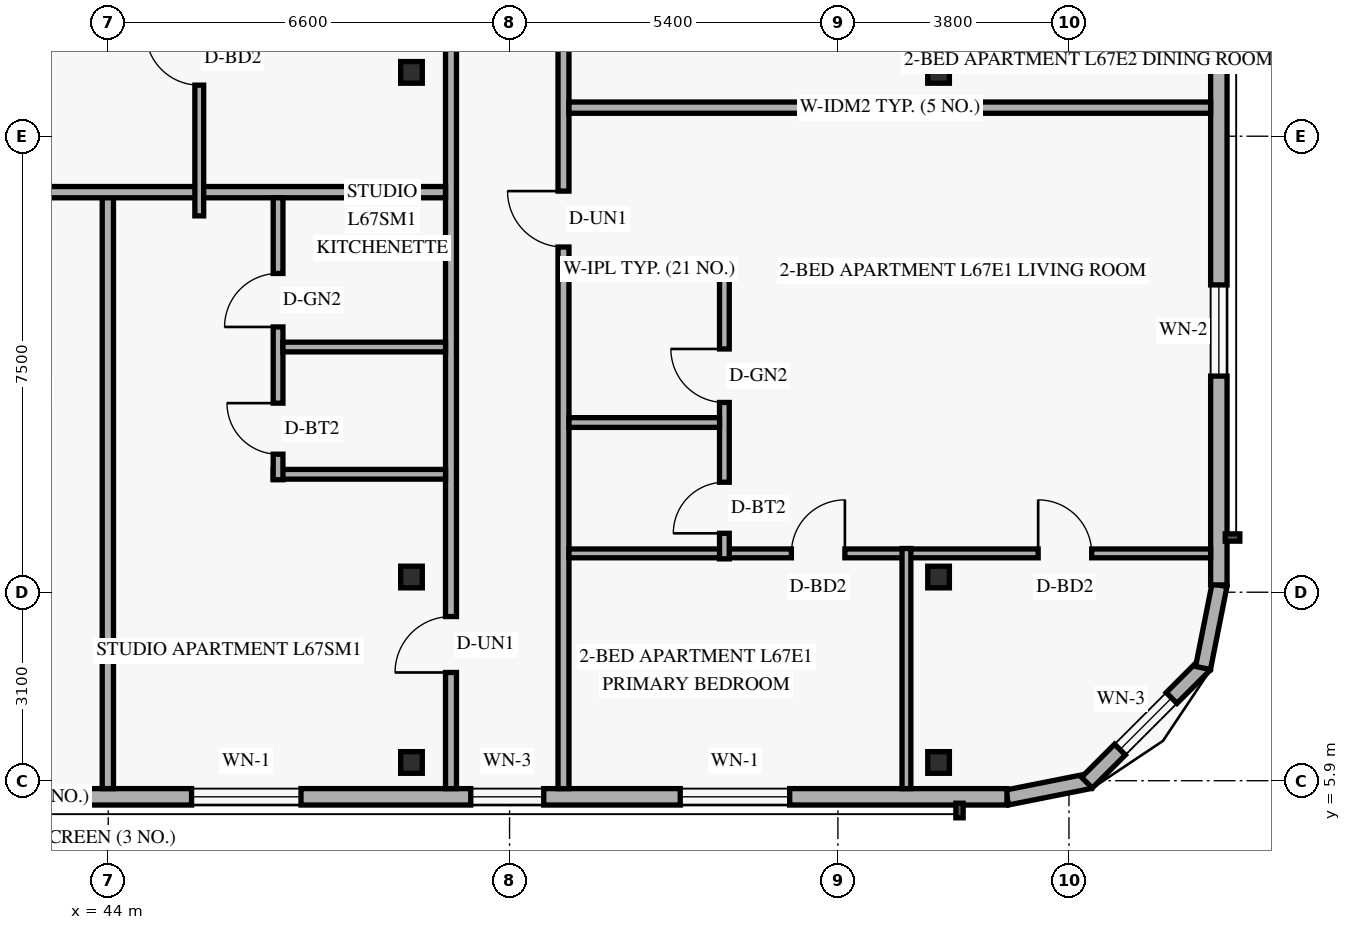
"""IFC4 building model, lengths in metres.
Left out: names, types, materials, properties, quantities, classifications, styles, units other than length and angle.
Written with IfcOpenShell. Run it as: python <this file> out.ifc"""

import sys

from ifc_helpers import new_model, si_unit, direction, frame, frame_2d, origin, origin_2d, place, context, subcontext, project, spatial, rectangle, hollow_rectangle, extrude, element, fill, save


model = new_model("IFC4")
c1 = context("Model", 3, precision=1e-05, world=origin(), true_north=direction((0.0, 1.0)))
c2 = subcontext(c1, "Body", "Model", "MODEL_VIEW")
j1 = project(units=[si_unit("LENGTHUNIT", "METRE"), si_unit("PLANEANGLEUNIT", "RADIAN")], contexts=[c1])
p1 = place(None, origin())
s1 = spatial("IfcSite", under=j1, at=p1, CompositionType="ELEMENT")
p2 = place(p1, origin())
s2 = spatial("IfcBuilding", under=s1, at=p2, CompositionType="ELEMENT")
p3 = place(p2, frame((0.0, 0.0, 256.8)))
s3 = spatial("IfcBuildingStorey", under=s2, at=p3, CompositionType="ELEMENT", Elevation=256.8)
for number, where, z_axis, x_axis in (
    (1, (48.924, 6.2, 0.0), (0.035, 0.0, 0.999), (0.0, 1.0, 0.0)),
    (2, (48.924, 9.25, 0.0), (0.035, 0.0, 0.999), (0.0, 1.0, 0.0)),
    (3, (48.924, 17.55, 0.0), (0.035, 0.0, 0.999), (0.0, 1.0, 0.0)),
):
    element("IfcColumn", number, at=place(p3, frame(where, z_axis=z_axis, x_axis=x_axis)), inside=s3, PredefinedType="COLUMN", context=c2, shape_type="SweptSolid", body=[
        extrude(hollow_rectangle(XDim=0.356, YDim=0.356, WallThickness=0.016, at=origin_2d()), origin(), (0.0, 0.0, 1.0), 3.602),
    ])
for number, where, z_axis, x_axis in (
    (4, (57.551, 6.2, 0.0), (0.058, 0.0, 0.998), (0.0, 1.0, 0.0)),
    (5, (57.551, 9.25, 0.0), (0.058, 0.0, 0.998), (0.0, 1.0, 0.0)),
    (6, (57.551, 17.55, 0.0), (0.058, 0.0, 0.998), (0.0, 1.0, 0.0)),
):
    element("IfcColumn", number, at=place(p3, frame(where, z_axis=z_axis, x_axis=x_axis)), inside=s3, PredefinedType="COLUMN", context=c2, shape_type="SweptSolid", body=[
        extrude(hollow_rectangle(XDim=0.356, YDim=0.356, WallThickness=0.016, at=origin_2d()), origin(), (0.0, 0.0, 1.0), 3.606),
    ])
p4 = place(p3, frame((58.783, 5.624, 0.0), z_axis=(0.0, 0.0, 1.0), x_axis=(0.980809899341, 0.19496651342, 0.0)))
e7 = element("IfcWall", 7, at=p4, inside=s3, PredefinedType="SOLIDWALL", context=c2, shape_type="SweptSolid", body=[
    extrude(rectangle(XDim=1.389, YDim=0.25, at=frame_2d((0.694, 0.0))), origin(), (0.0, 0.0, 1.0), 3.36),
])
p5 = place(p3, frame((60.095, 5.868, 0.0), z_axis=(0.0, 0.0, 1.0), x_axis=(0.707106781187, 0.707106781187, 0.0)))
e8 = element("IfcWall", 8, at=p5, inside=s3, PredefinedType="SOLIDWALL", context=c2, shape_type="SweptSolid", body=[
    extrude(rectangle(XDim=2.739, YDim=0.25, at=frame_2d((1.37, 0.0))), origin(), (0.0, 0.0, 1.0), 3.36),
])
p6 = place(p5, frame((0.77, 0.0, 0.85)))
e9 = element("IfcOpeningElement", 9, at=p6, cuts=e8, PredefinedType="OPENING", context=c2, shape_type="SweptSolid", body=[
    extrude(rectangle(XDim=1.2, YDim=1.5, at=frame_2d((0.6, 0.75))), frame((0.0, 0.135, 0.0), z_axis=(0.0, -1.0, 0.0), x_axis=(1.0, 0.0, 0.0)), (0.0, 0.0, 1.0), 0.27),
])
p7 = place(p3, frame((62.005, 7.754, 0.0), z_axis=(0.0, 0.0, 1.0), x_axis=(0.195135625965, 0.9807762678, 0.0)))
e10 = element("IfcWall", 10, at=p7, inside=s3, PredefinedType="SOLIDWALL", context=c2, shape_type="SweptSolid", body=[
    extrude(rectangle(XDim=1.389, YDim=0.25, at=frame_2d((0.694, 0.0))), origin(), (0.0, 0.0, 1.0), 3.36),
])
p8 = place(p3, frame((25.82, 5.635, 0.0), z_axis=(0.0, 0.0, 1.0), x_axis=(1.0, 0.0, 0.0)))
e11 = element("IfcWall", 11, at=p8, inside=s3, PredefinedType="SOLIDWALL", context=c2, shape_type="SweptSolid", body=[
    extrude(rectangle(XDim=32.96, YDim=0.27, at=frame_2d((16.48, 0.0))), origin(), (0.0, 0.0, 1.0), 3.36),
])
p9 = place(p8, frame((3.57, 0.0, 0.85)))
e12 = element("IfcOpeningElement", 12, at=p9, cuts=e11, PredefinedType="OPENING", context=c2, shape_type="SweptSolid", body=[
    extrude(rectangle(XDim=1.8, YDim=1.6, at=frame_2d((0.9, 0.8))), frame((0.0, 0.145, 0.0), z_axis=(0.0, -1.0, 0.0), x_axis=(1.0, 0.0, 0.0)), (0.0, 0.0, 1.0), 0.29),
])
p10 = place(p8, frame((19.55, 0.0, 0.85)))
e13 = element("IfcOpeningElement", 13, at=p10, cuts=e11, PredefinedType="OPENING", context=c2, shape_type="SweptSolid", body=[
    extrude(rectangle(XDim=1.8, YDim=1.6, at=frame_2d((0.9, 0.8))), frame((0.0, 0.145, 0.0), z_axis=(0.0, -1.0, 0.0), x_axis=(1.0, 0.0, 0.0)), (0.0, 0.0, 1.0), 0.29),
])
p11 = place(p8, frame((24.142, 0.0, 0.85)))
e14 = element("IfcOpeningElement", 14, at=p11, cuts=e11, PredefinedType="OPENING", context=c2, shape_type="SweptSolid", body=[
    extrude(rectangle(XDim=1.2, YDim=1.5, at=frame_2d((0.6, 0.75))), frame((0.0, 0.145, 0.0), z_axis=(0.0, -1.0, 0.0), x_axis=(1.0, 0.0, 0.0)), (0.0, 0.0, 1.0), 0.29),
])
p12 = place(p8, frame((27.587, 0.0, 0.85)))
e15 = element("IfcOpeningElement", 15, at=p12, cuts=e11, PredefinedType="OPENING", context=c2, shape_type="SweptSolid", body=[
    extrude(rectangle(XDim=1.8, YDim=1.6, at=frame_2d((0.9, 0.8))), frame((0.0, 0.145, 0.0), z_axis=(0.0, -1.0, 0.0), x_axis=(1.0, 0.0, 0.0)), (0.0, 0.0, 1.0), 0.29),
])
p13 = place(p3, frame((62.265, 9.12, 0.0), z_axis=(0.0, 0.0, 1.0), x_axis=(0.0, 1.0, 0.0)))
e16 = element("IfcWall", 16, at=p13, inside=s3, PredefinedType="SOLIDWALL", context=c2, shape_type="SweptSolid", body=[
    extrude(rectangle(XDim=11.105, YDim=0.27, at=frame_2d((5.553, 0.0))), origin(), (0.0, 0.0, 1.0), 3.36),
])
p14 = place(p13, frame((3.435, 0.0, 0.85)))
e17 = element("IfcOpeningElement", 17, at=p14, cuts=e16, PredefinedType="OPENING", context=c2, shape_type="SweptSolid", body=[
    extrude(rectangle(XDim=1.5, YDim=1.55, at=frame_2d((0.75, 0.775))), frame((0.0, 0.145, 0.0), z_axis=(0.0, -1.0, 0.0), x_axis=(1.0, 0.0, 0.0)), (0.0, 0.0, 1.0), 0.29),
])
p15 = place(p13, frame((8.728, 0.0, 0.85)))
e18 = element("IfcOpeningElement", 18, at=p15, cuts=e16, PredefinedType="OPENING", context=c2, shape_type="SweptSolid", body=[
    extrude(rectangle(XDim=1.5, YDim=1.55, at=frame_2d((0.75, 0.775))), frame((0.0, 0.145, 0.0), z_axis=(0.0, -1.0, 0.0), x_axis=(1.0, 0.0, 0.0)), (0.0, 0.0, 1.0), 0.29),
])
p16 = place(p3, frame((49.637, 5.77, 0.0), z_axis=(0.0, 0.0, 1.0), x_axis=(0.0, 1.0, 0.0)))
e19 = element("IfcWall", 19, at=p16, inside=s3, PredefinedType="STANDARD", context=c2, shape_type="SweptSolid", body=[
    extrude(rectangle(XDim=17.03, YDim=0.18, at=frame_2d((8.515, 0.0))), origin(), (0.0, 0.0, 1.0), 2.803),
])
p17 = place(p16, frame((1.91, 0.0, 0.0)))
e20 = element("IfcOpeningElement", 20, at=p17, cuts=e19, PredefinedType="OPENING", context=c2, shape_type="SweptSolid", body=[
    extrude(rectangle(XDim=0.92, YDim=2.15, at=frame_2d((0.46, 1.075))), frame((0.0, 0.1, 0.0), z_axis=(0.0, -1.0, 0.0), x_axis=(1.0, 0.0, 0.0)), (0.0, 0.0, 1.0), 0.2),
])
p18 = place(p3, frame((51.487, 5.77, 0.0), z_axis=(0.0, 0.0, 1.0), x_axis=(0.0, 1.0, 0.0)))
e21 = element("IfcWall", 21, at=p18, inside=s3, PredefinedType="STANDARD", context=c2, shape_type="SweptSolid", body=[
    extrude(rectangle(XDim=36.46, YDim=0.18, at=frame_2d((18.23, 0.0))), origin(), (0.0, 0.0, 1.0), 2.803),
])
p19 = place(p18, frame((8.907, 0.0, 0.0)))
e22 = element("IfcOpeningElement", 22, at=p19, cuts=e21, PredefinedType="OPENING", context=c2, shape_type="SweptSolid", body=[
    extrude(rectangle(XDim=0.92, YDim=2.15, at=frame_2d((0.46, 1.075))), frame((0.0, 0.1, 0.0), z_axis=(0.0, -1.0, 0.0), x_axis=(1.0, 0.0, 0.0)), (0.0, 0.0, 1.0), 0.2),
])
p20 = place(p18, frame((15.633, 0.0, 0.0)))
e23 = element("IfcOpeningElement", 23, at=p20, cuts=e21, PredefinedType="OPENING", context=c2, shape_type="SweptSolid", body=[
    extrude(rectangle(XDim=0.92, YDim=2.15, at=frame_2d((0.46, 1.075))), frame((0.0, 0.1, 0.0), z_axis=(0.0, -1.0, 0.0), x_axis=(1.0, 0.0, 0.0)), (0.0, 0.0, 1.0), 0.2),
])
p21 = place(p18, frame((26.685, 0.0, 0.0)))
e24 = element("IfcOpeningElement", 24, at=p21, cuts=e21, PredefinedType="OPENING", context=c2, shape_type="SweptSolid", body=[
    extrude(rectangle(XDim=0.92, YDim=2.15, at=frame_2d((0.46, 1.075))), frame((0.0, 0.1, 0.0), z_axis=(0.0, -1.0, 0.0), x_axis=(1.0, 0.0, 0.0)), (0.0, 0.0, 1.0), 0.2),
])
p22 = place(p3, frame((51.577, 9.639, 0.0), z_axis=(0.0, 0.0, 1.0), x_axis=(1.0, 0.0, 0.0)))
e25 = element("IfcWall", 25, at=p22, inside=s3, PredefinedType="PARTITIONING", context=c2, shape_type="SweptSolid", body=[
    extrude(rectangle(XDim=10.553, YDim=0.145, at=frame_2d((5.276, 0.0))), origin(), (0.0, 0.0, 1.0), 2.879),
])
p23 = place(p22, frame((3.658, 0.0, 0.0)))
e26 = element("IfcOpeningElement", 26, at=p23, cuts=e25, PredefinedType="OPENING", context=c2, shape_type="SweptSolid", body=[
    extrude(rectangle(XDim=0.88, YDim=2.14, at=frame_2d((0.44, 1.07))), frame((0.0, 0.083, 0.0), z_axis=(0.0, -1.0, 0.0), x_axis=(1.0, 0.0, 0.0)), (0.0, 0.0, 1.0), 0.165),
])
p24 = place(p22, frame((7.717, 0.0, 0.0)))
e27 = element("IfcOpeningElement", 27, at=p24, cuts=e25, PredefinedType="OPENING", context=c2, shape_type="SweptSolid", body=[
    extrude(rectangle(XDim=0.88, YDim=2.14, at=frame_2d((0.44, 1.07))), frame((0.0, 0.083, 0.0), z_axis=(0.0, -1.0, 0.0), x_axis=(1.0, 0.0, 0.0)), (0.0, 0.0, 1.0), 0.165),
])
p25 = place(p3, frame((51.577, 14.317, 0.0), z_axis=(0.0, 0.0, 1.0), x_axis=(1.0, 0.0, 0.0)))
e28 = element("IfcWall", 28, at=p25, inside=s3, PredefinedType="PLUMBINGWALL", context=c2, shape_type="SweptSolid", body=[
    extrude(rectangle(XDim=2.636, YDim=0.16, at=frame_2d((1.318, 0.0))), origin(), (0.0, 0.0, 1.0), 3.36),
])
p26 = place(p3, frame((54.133, 9.549, 0.0), z_axis=(0.0, 0.0, 1.0), x_axis=(0.0, 1.0, 0.0)))
e29 = element("IfcWall", 29, at=p26, inside=s3, PredefinedType="PLUMBINGWALL", context=c2, shape_type="SweptSolid", body=[
    extrude(rectangle(XDim=4.858, YDim=0.16, at=frame_2d((2.429, 0.0))), origin(), (0.0, 0.0, 1.0), 3.039),
])
p27 = place(p26, frame((0.42, 0.0, 0.0)))
e30 = element("IfcOpeningElement", 30, at=p27, cuts=e29, PredefinedType="OPENING", context=c2, shape_type="SweptSolid", body=[
    extrude(rectangle(XDim=0.84, YDim=2.12, at=frame_2d((0.42, 1.06))), frame((0.0, 0.09, 0.0), z_axis=(0.0, -1.0, 0.0), x_axis=(1.0, 0.0, 0.0)), (0.0, 0.0, 1.0), 0.18),
])
p28 = place(p26, frame((2.572, 0.0, 0.0)))
e31 = element("IfcOpeningElement", 31, at=p28, cuts=e29, PredefinedType="OPENING", context=c2, shape_type="SweptSolid", body=[
    extrude(rectangle(XDim=0.88, YDim=2.12, at=frame_2d((0.44, 1.06))), frame((0.0, 0.09, 0.0), z_axis=(0.0, -1.0, 0.0), x_axis=(1.0, 0.0, 0.0)), (0.0, 0.0, 1.0), 0.18),
])
p29 = place(p3, frame((51.577, 11.791, 0.0), z_axis=(0.0, 0.0, 1.0), x_axis=(1.0, 0.0, 0.0)))
e32 = element("IfcWall", 32, at=p29, inside=s3, PredefinedType="PLUMBINGWALL", context=c2, shape_type="SweptSolid", body=[
    extrude(rectangle(XDim=2.476, YDim=0.16, at=frame_2d((1.238, 0.0))), origin(), (0.0, 0.0, 1.0), 3.36),
])
p30 = place(p3, frame((57.127, 5.77, 0.0), z_axis=(0.0, 0.0, 1.0), x_axis=(0.0, 1.0, 0.0)))
e33 = element("IfcWall", 33, at=p30, inside=s3, PredefinedType="PARTITIONING", context=c2, shape_type="SweptSolid", body=[
    extrude(rectangle(XDim=3.949, YDim=0.145, at=frame_2d((1.975, 0.0))), origin(), (0.0, 0.0, 1.0), 2.803),
])
p31 = place(p3, frame((51.577, 16.97, 0.0), z_axis=(0.0, 0.0, 1.0), x_axis=(1.0, 0.0, 0.0)))
e34 = element("IfcWall", 34, at=p31, inside=s3, PredefinedType="PARTITIONING", context=c2, shape_type="SweptSolid", body=[
    extrude(rectangle(XDim=10.553, YDim=0.185, at=frame_2d((5.276, 0.0))), origin(), (0.0, 0.0, 1.0), 2.879),
])
p32 = place(p3, frame((43.993, 5.77, 0.0), z_axis=(0.0, 0.0, 1.0), x_axis=(0.0, 1.0, 0.0)))
e35 = element("IfcWall", 35, at=p32, inside=s3, PredefinedType="PARTITIONING", context=c2, shape_type="SweptSolid", body=[
    extrude(rectangle(XDim=9.81, YDim=0.185, at=frame_2d((4.905, 0.0))), origin(), (0.0, 0.0, 1.0), 2.803),
])
p33 = place(p3, frame((38.423, 15.58, 0.0), z_axis=(0.0, 0.0, 1.0), x_axis=(1.0, 0.0, 0.0)))
e36 = element("IfcWall", 36, at=p33, inside=s3, PredefinedType="PARTITIONING", context=c2, shape_type="SweptSolid", body=[
    extrude(rectangle(XDim=11.125, YDim=0.185, at=frame_2d((5.562, 0.0))), origin(), (0.0, 0.0, 1.0), 2.803),
])
p34 = place(p3, frame((46.713, 10.94, 0.0), z_axis=(0.0, 0.0, 1.0), x_axis=(1.0, 0.0, 0.0)))
e37 = element("IfcWall", 37, at=p34, inside=s3, PredefinedType="PLUMBINGWALL", context=c2, shape_type="SweptSolid", body=[
    extrude(rectangle(XDim=2.834, YDim=0.16, at=frame_2d((1.417, 0.0))), origin(), (0.0, 0.0, 1.0), 2.803),
])
p35 = place(p3, frame((46.793, 10.85, 0.0), z_axis=(0.0, 0.0, 1.0), x_axis=(0.0, 1.0, 0.0)))
e38 = element("IfcWall", 38, at=p35, inside=s3, PredefinedType="PLUMBINGWALL", context=c2, shape_type="SweptSolid", body=[
    extrude(rectangle(XDim=4.637, YDim=0.16, at=frame_2d((2.319, 0.0))), origin(), (0.0, 0.0, 1.0), 3.039),
])
p36 = place(p35, frame((0.42, 0.0, 0.0)))
e39 = element("IfcOpeningElement", 39, at=p36, cuts=e38, PredefinedType="OPENING", context=c2, shape_type="SweptSolid", body=[
    extrude(rectangle(XDim=0.84, YDim=2.12, at=frame_2d((0.42, 1.06))), frame((0.0, 0.09, 0.0), z_axis=(0.0, -1.0, 0.0), x_axis=(1.0, 0.0, 0.0)), (0.0, 0.0, 1.0), 0.18),
])
p37 = place(p35, frame((2.513, 0.0, 0.0)))
e40 = element("IfcOpeningElement", 40, at=p37, cuts=e38, PredefinedType="OPENING", context=c2, shape_type="SweptSolid", body=[
    extrude(rectangle(XDim=0.88, YDim=2.12, at=frame_2d((0.44, 1.06))), frame((0.0, 0.09, 0.0), z_axis=(0.0, -1.0, 0.0), x_axis=(1.0, 0.0, 0.0)), (0.0, 0.0, 1.0), 0.18),
])
p38 = place(p3, frame((46.873, 13.033, 0.0), z_axis=(0.0, 0.0, 1.0), x_axis=(1.0, 0.0, 0.0)))
e41 = element("IfcWall", 41, at=p38, inside=s3, PredefinedType="PLUMBINGWALL", context=c2, shape_type="SweptSolid", body=[
    extrude(rectangle(XDim=2.674, YDim=0.16, at=frame_2d((1.337, 0.0))), origin(), (0.0, 0.0, 1.0), 2.803),
])
p39 = place(p3, frame((45.497, 15.19, 0.0), z_axis=(0.0, 0.0, 1.0), x_axis=(0.0, 1.0, 0.0)))
e42 = element("IfcWall", 42, at=p39, inside=s3, PredefinedType="PARTITIONING", context=c2, shape_type="SweptSolid", body=[
    extrude(rectangle(XDim=7.52, YDim=0.145, at=frame_2d((3.76, 0.0))), origin(), (0.0, 0.0, 1.0), 2.803),
])
p40 = place(p39, frame((2.15, 0.0, 0.0)))
e43 = element("IfcOpeningElement", 43, at=p40, cuts=e42, PredefinedType="OPENING", context=c2, shape_type="SweptSolid", body=[
    extrude(rectangle(XDim=0.88, YDim=2.14, at=frame_2d((0.44, 1.07))), frame((0.0, 0.083, 0.0), z_axis=(0.0, -1.0, 0.0), x_axis=(1.0, 0.0, 0.0)), (0.0, 0.0, 1.0), 0.165),
])
p41 = place(p6, origin())
e44 = element("IfcWindow", 44, at=p41, inside=s3, PartitioningType="SINGLE_PANEL", PredefinedType="WINDOW", context=c2, shape_type="SweptSolid", body=[
    extrude(rectangle(XDim=1.2, YDim=1.5, at=frame_2d((0.6, 0.75))), frame((0.0, 0.03, 0.0), z_axis=(0.0, -1.0, 0.0), x_axis=(1.0, 0.0, 0.0)), (0.0, 0.0, 1.0), 0.06),
])
fill(e9, e44)
p42 = place(p10, origin())
e45 = element("IfcWindow", 45, at=p42, inside=s3, PartitioningType="SINGLE_PANEL", PredefinedType="WINDOW", context=c2, shape_type="SweptSolid", body=[
    extrude(rectangle(XDim=1.8, YDim=1.6, at=frame_2d((0.9, 0.8))), frame((0.0, 0.03, 0.0), z_axis=(0.0, -1.0, 0.0), x_axis=(1.0, 0.0, 0.0)), (0.0, 0.0, 1.0), 0.06),
])
fill(e13, e45)
p43 = place(p11, origin())
e46 = element("IfcWindow", 46, at=p43, inside=s3, PartitioningType="SINGLE_PANEL", PredefinedType="WINDOW", context=c2, shape_type="SweptSolid", body=[
    extrude(rectangle(XDim=1.2, YDim=1.5, at=frame_2d((0.6, 0.75))), frame((0.0, 0.03, 0.0), z_axis=(0.0, -1.0, 0.0), x_axis=(1.0, 0.0, 0.0)), (0.0, 0.0, 1.0), 0.06),
])
fill(e14, e46)
p44 = place(p12, origin())
e47 = element("IfcWindow", 47, at=p44, inside=s3, PartitioningType="SINGLE_PANEL", PredefinedType="WINDOW", context=c2, shape_type="SweptSolid", body=[
    extrude(rectangle(XDim=1.8, YDim=1.6, at=frame_2d((0.9, 0.8))), frame((0.0, 0.03, 0.0), z_axis=(0.0, -1.0, 0.0), x_axis=(1.0, 0.0, 0.0)), (0.0, 0.0, 1.0), 0.06),
])
fill(e15, e47)
p45 = place(p14, origin())
e48 = element("IfcWindow", 48, at=p45, inside=s3, PartitioningType="SINGLE_PANEL", PredefinedType="WINDOW", context=c2, shape_type="SweptSolid", body=[
    extrude(rectangle(XDim=1.5, YDim=1.55, at=frame_2d((0.75, 0.775))), frame((0.0, 0.03, 0.0), z_axis=(0.0, -1.0, 0.0), x_axis=(1.0, 0.0, 0.0)), (0.0, 0.0, 1.0), 0.06),
])
fill(e17, e48)
p46 = place(p15, origin())
e49 = element("IfcWindow", 49, at=p46, inside=s3, PartitioningType="SINGLE_PANEL", PredefinedType="WINDOW", context=c2, shape_type="SweptSolid", body=[
    extrude(rectangle(XDim=1.5, YDim=1.55, at=frame_2d((0.75, 0.775))), frame((0.0, 0.03, 0.0), z_axis=(0.0, -1.0, 0.0), x_axis=(1.0, 0.0, 0.0)), (0.0, 0.0, 1.0), 0.06),
])
fill(e18, e49)
p47 = place(p19, origin())
e50 = element("IfcDoor", 50, at=p47, inside=s3, OperationType="SINGLE_SWING_RIGHT", PredefinedType="DOOR", context=c2, shape_type="SweptSolid", body=[
    extrude(rectangle(XDim=0.92, YDim=2.15, at=frame_2d((0.46, 1.075))), frame((0.0, 0.025, 0.0), z_axis=(0.0, -1.0, 0.0), x_axis=(1.0, 0.0, 0.0)), (0.0, 0.0, 1.0), 0.05),
])
fill(e22, e50)
p48 = place(p27, origin())
e51 = element("IfcDoor", 51, at=p48, inside=s3, OperationType="SINGLE_SWING_LEFT", PredefinedType="DOOR", context=c2, shape_type="SweptSolid", body=[
    extrude(rectangle(XDim=0.84, YDim=2.12, at=frame_2d((0.42, 1.06))), frame((0.0, 0.025, 0.0), z_axis=(0.0, -1.0, 0.0), x_axis=(1.0, 0.0, 0.0)), (0.0, 0.0, 1.0), 0.05),
])
fill(e30, e51)
p49 = place(p28, origin())
e52 = element("IfcDoor", 52, at=p49, inside=s3, OperationType="SINGLE_SWING_RIGHT", PredefinedType="DOOR", context=c2, shape_type="SweptSolid", body=[
    extrude(rectangle(XDim=0.88, YDim=2.12, at=frame_2d((0.44, 1.06))), frame((0.0, 0.025, 0.0), z_axis=(0.0, -1.0, 0.0), x_axis=(1.0, 0.0, 0.0)), (0.0, 0.0, 1.0), 0.05),
])
fill(e31, e52)
p50 = place(p23, origin())
e53 = element("IfcDoor", 53, at=p50, inside=s3, OperationType="SINGLE_SWING_RIGHT", PredefinedType="DOOR", context=c2, shape_type="SweptSolid", body=[
    extrude(rectangle(XDim=0.88, YDim=2.14, at=frame_2d((0.44, 1.07))), frame((0.0, 0.025, 0.0), z_axis=(0.0, -1.0, 0.0), x_axis=(1.0, 0.0, 0.0)), (0.0, 0.0, 1.0), 0.05),
])
fill(e26, e53)
p51 = place(p24, origin())
e54 = element("IfcDoor", 54, at=p51, inside=s3, OperationType="SINGLE_SWING_LEFT", PredefinedType="DOOR", context=c2, shape_type="SweptSolid", body=[
    extrude(rectangle(XDim=0.88, YDim=2.14, at=frame_2d((0.44, 1.07))), frame((0.0, 0.025, 0.0), z_axis=(0.0, -1.0, 0.0), x_axis=(1.0, 0.0, 0.0)), (0.0, 0.0, 1.0), 0.05),
])
fill(e27, e54)
p52 = place(p17, origin())
e55 = element("IfcDoor", 55, at=p52, inside=s3, OperationType="SINGLE_SWING_LEFT", PredefinedType="DOOR", context=c2, shape_type="SweptSolid", body=[
    extrude(rectangle(XDim=0.92, YDim=2.15, at=frame_2d((0.46, 1.075))), frame((0.0, 0.025, 0.0), z_axis=(0.0, -1.0, 0.0), x_axis=(1.0, 0.0, 0.0)), (0.0, 0.0, 1.0), 0.05),
])
fill(e20, e55)
p53 = place(p36, origin())
e56 = element("IfcDoor", 56, at=p53, inside=s3, OperationType="SINGLE_SWING_RIGHT", PredefinedType="DOOR", context=c2, shape_type="SweptSolid", body=[
    extrude(rectangle(XDim=0.84, YDim=2.12, at=frame_2d((0.42, 1.06))), frame((0.0, 0.025, 0.0), z_axis=(0.0, -1.0, 0.0), x_axis=(1.0, 0.0, 0.0)), (0.0, 0.0, 1.0), 0.05),
])
fill(e39, e56)
p54 = place(p37, origin())
e57 = element("IfcDoor", 57, at=p54, inside=s3, OperationType="SINGLE_SWING_LEFT", PredefinedType="DOOR", context=c2, shape_type="SweptSolid", body=[
    extrude(rectangle(XDim=0.88, YDim=2.12, at=frame_2d((0.44, 1.06))), frame((0.0, 0.025, 0.0), z_axis=(0.0, -1.0, 0.0), x_axis=(1.0, 0.0, 0.0)), (0.0, 0.0, 1.0), 0.05),
])
fill(e40, e57)
p55 = place(p40, origin())
e58 = element("IfcDoor", 58, at=p55, inside=s3, OperationType="SINGLE_SWING_RIGHT", PredefinedType="DOOR", context=c2, shape_type="SweptSolid", body=[
    extrude(rectangle(XDim=0.88, YDim=2.14, at=frame_2d((0.44, 1.07))), frame((0.0, 0.025, 0.0), z_axis=(0.0, -1.0, 0.0), x_axis=(1.0, 0.0, 0.0)), (0.0, 0.0, 1.0), 0.05),
])
fill(e43, e58)
save(model, sys.argv[1])
